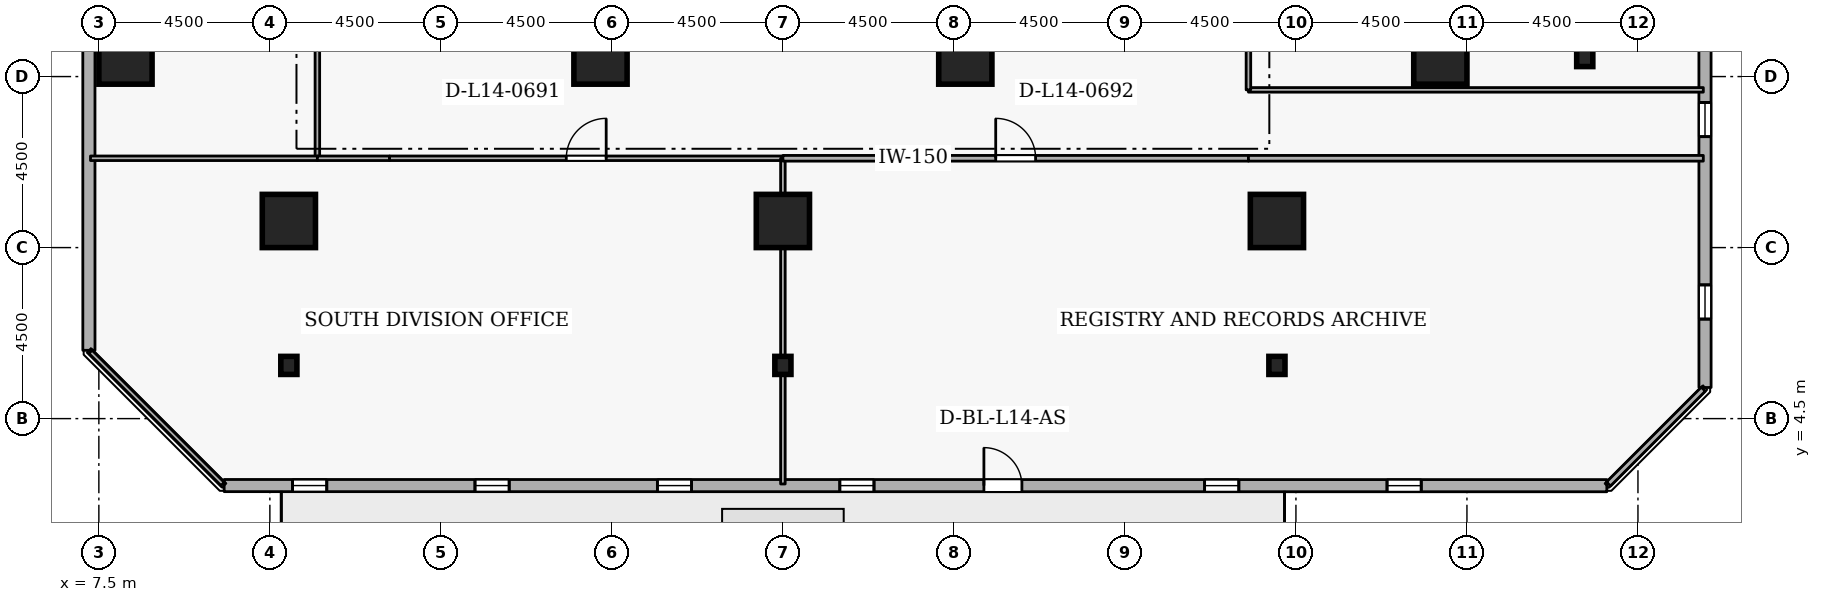
"""IFC4 building model, lengths in metres.
Left out: names, types, materials, properties, quantities, classifications, styles, units other than length and angle.
Written with IfcOpenShell. Run it as: python <this file> out.ifc"""

import sys

from ifc_helpers import new_model, si_unit, direction, frame, frame_2d, origin, origin_2d, place, context, subcontext, project, spatial, rectangle, i_section, extrude, element, fill, save


model = new_model("IFC4")
c1 = context("Model", 3, precision=1e-05, world=origin(), true_north=direction((0.0, 1.0)))
c2 = subcontext(c1, "Body", "Model", "MODEL_VIEW")
j1 = project(units=[si_unit("LENGTHUNIT", "METRE"), si_unit("PLANEANGLEUNIT", "RADIAN")], contexts=[c1])
p1 = place(None, origin())
s1 = spatial("IfcSite", under=j1, at=p1, CompositionType="ELEMENT")
p2 = place(p1, origin())
s2 = spatial("IfcBuilding", under=s1, at=p2, CompositionType="ELEMENT")
p3 = place(p2, frame((0.0, 0.0, 57.3)))
s3 = spatial("IfcBuildingStorey", under=s2, at=p3, CompositionType="ELEMENT", Elevation=57.3)
for number, where, z_axis, x_axis in (
    (1, (12.5, 9.7, 0.0), (0.0, 0.0, 1.0), (1.0, 0.0, 0.0)),
    (2, (25.5, 9.7, 0.0), (0.0, 0.0, 1.0), (1.0, 0.0, 0.0)),
    (3, (38.5, 9.7, 0.0), (0.0, 0.0, 1.0), (1.0, 0.0, 0.0)),
    (4, (42.8, 14.0, 0.0), (0.0, 0.0, 1.0), (1.0, 0.0, 0.0)),
    (5, (8.2, 14.0, 0.0), (0.0, 0.0, 1.0), (1.0, 0.0, 0.0)),
    (6, (20.7, 14.0, 0.0), (0.0, 0.0, 1.0), (1.0, 0.0, 0.0)),
    (7, (30.3, 14.0, 0.0), (0.0, 0.0, 1.0), (1.0, 0.0, 0.0)),
):
    element("IfcColumn", number, at=place(p3, frame(where, z_axis=z_axis, x_axis=x_axis)), inside=s3, PredefinedType="COLUMN", context=c2, shape_type="SweptSolid", body=[
        extrude(rectangle(XDim=1.4, YDim=1.4, at=origin_2d()), origin(), (0.0, 0.0, 1.0), 3.6),
    ])
for number, where, z_axis, x_axis in (
    (8, (12.5, 5.9, 0.0), (0.0, 0.0, 1.0), (1.0, 0.0, 0.0)),
    (9, (25.5, 5.9, 0.0), (0.0, 0.0, 1.0), (1.0, 0.0, 0.0)),
    (10, (38.5, 5.9, 0.0), (0.0, 0.0, 1.0), (1.0, 0.0, 0.0)),
    (11, (46.6, 14.0, 0.0), (0.0, 0.0, 1.0), (1.0, 0.0, 0.0)),
):
    element("IfcColumn", number, at=place(p3, frame(where, z_axis=z_axis, x_axis=x_axis)), inside=s3, PredefinedType="COLUMN", context=c2, shape_type="SweptSolid", body=[
        extrude(i_section(OverallWidth=0.424, OverallDepth=0.475, WebThickness=0.048, FlangeThickness=0.077, FilletRadius=0.015, at=origin_2d()), origin(), (0.0, 0.0, 1.0), 3.6),
    ])
p4 = place(p3, frame((10.797, 2.738, 0.0), z_axis=(0.0, 0.0, 1.0), x_axis=(0.999999996195, -8.7231344e-05, 0.0)))
e12 = element("IfcWall", 12, at=p4, inside=s3, PredefinedType="STANDARD", context=c2, shape_type="SweptSolid", body=[
    extrude(rectangle(XDim=36.384, YDim=0.32, at=frame_2d((18.192, 0.0))), origin(), (0.0, 0.0, 1.0), 2.7),
])
p5 = place(p4, frame((19.992, 0.0, 0.0)))
e13 = element("IfcOpeningElement", 13, at=p5, cuts=e12, PredefinedType="OPENING", context=c2, shape_type="SweptSolid", body=[
    extrude(rectangle(XDim=1.0, YDim=2.08, at=frame_2d((0.5, 1.04))), frame((0.0, 0.17, 0.0), z_axis=(0.0, -1.0, 0.0), x_axis=(1.0, 0.0, 0.0)), (0.0, 0.0, 1.0), 0.34),
])
p6 = place(p4, frame((1.8, 0.0, 0.72)))
e14 = element("IfcOpeningElement", 14, at=p6, cuts=e12, PredefinedType="OPENING", context=c2, shape_type="SweptSolid", body=[
    extrude(rectangle(XDim=0.9, YDim=1.75, at=frame_2d((0.45, 0.875))), frame((0.0, 0.17, 0.0), z_axis=(0.0, -1.0, 0.0), x_axis=(1.0, 0.0, 0.0)), (0.0, 0.0, 1.0), 0.34),
])
p7 = place(p4, frame((6.6, 0.0, 0.72)))
e15 = element("IfcOpeningElement", 15, at=p7, cuts=e12, PredefinedType="OPENING", context=c2, shape_type="SweptSolid", body=[
    extrude(rectangle(XDim=0.9, YDim=1.75, at=frame_2d((0.45, 0.875))), frame((0.0, 0.17, 0.0), z_axis=(0.0, -1.0, 0.0), x_axis=(1.0, 0.0, 0.0)), (0.0, 0.0, 1.0), 0.34),
])
p8 = place(p4, frame((11.4, 0.0, 0.72)))
e16 = element("IfcOpeningElement", 16, at=p8, cuts=e12, PredefinedType="OPENING", context=c2, shape_type="SweptSolid", body=[
    extrude(rectangle(XDim=0.9, YDim=1.75, at=frame_2d((0.45, 0.875))), frame((0.0, 0.17, 0.0), z_axis=(0.0, -1.0, 0.0), x_axis=(1.0, 0.0, 0.0)), (0.0, 0.0, 1.0), 0.34),
])
p9 = place(p4, frame((16.2, 0.0, 0.72)))
e17 = element("IfcOpeningElement", 17, at=p9, cuts=e12, PredefinedType="OPENING", context=c2, shape_type="SweptSolid", body=[
    extrude(rectangle(XDim=0.9, YDim=1.75, at=frame_2d((0.45, 0.875))), frame((0.0, 0.17, 0.0), z_axis=(0.0, -1.0, 0.0), x_axis=(1.0, 0.0, 0.0)), (0.0, 0.0, 1.0), 0.34),
])
p10 = place(p4, frame((25.8, 0.0, 0.72)))
e18 = element("IfcOpeningElement", 18, at=p10, cuts=e12, PredefinedType="OPENING", context=c2, shape_type="SweptSolid", body=[
    extrude(rectangle(XDim=0.9, YDim=1.75, at=frame_2d((0.45, 0.875))), frame((0.0, 0.17, 0.0), z_axis=(0.0, -1.0, 0.0), x_axis=(1.0, 0.0, 0.0)), (0.0, 0.0, 1.0), 0.34),
])
p11 = place(p4, frame((30.6, 0.0, 0.72)))
e19 = element("IfcOpeningElement", 19, at=p11, cuts=e12, PredefinedType="OPENING", context=c2, shape_type="SweptSolid", body=[
    extrude(rectangle(XDim=0.9, YDim=1.75, at=frame_2d((0.45, 0.875))), frame((0.0, 0.17, 0.0), z_axis=(0.0, -1.0, 0.0), x_axis=(1.0, 0.0, 0.0)), (0.0, 0.0, 1.0), 0.34),
])
p12 = place(p3, frame((49.765, 5.319, 0.0), z_axis=(0.0, 0.0, 1.0), x_axis=(-8.7231344e-05, 0.999999996195, 0.0)))
e20 = element("IfcWall", 20, at=p12, inside=s3, PredefinedType="STANDARD", context=c2, shape_type="SweptSolid", body=[
    extrude(rectangle(XDim=36.384, YDim=0.32, at=frame_2d((18.192, 0.0))), origin(), (0.0, 0.0, 1.0), 2.7),
])
p13 = place(p12, frame((1.8, 0.0, 0.72)))
e21 = element("IfcOpeningElement", 21, at=p13, cuts=e20, PredefinedType="OPENING", context=c2, shape_type="SweptSolid", body=[
    extrude(rectangle(XDim=0.9, YDim=1.75, at=frame_2d((0.45, 0.875))), frame((0.0, 0.17, 0.0), z_axis=(0.0, -1.0, 0.0), x_axis=(1.0, 0.0, 0.0)), (0.0, 0.0, 1.0), 0.34),
])
p14 = place(p12, frame((6.6, 0.0, 0.72)))
e22 = element("IfcOpeningElement", 22, at=p14, cuts=e20, PredefinedType="OPENING", context=c2, shape_type="SweptSolid", body=[
    extrude(rectangle(XDim=0.9, YDim=1.75, at=frame_2d((0.45, 0.875))), frame((0.0, 0.17, 0.0), z_axis=(0.0, -1.0, 0.0), x_axis=(1.0, 0.0, 0.0)), (0.0, 0.0, 1.0), 0.34),
])
p15 = place(p12, frame((11.4, 0.0, 0.72)))
e23 = element("IfcOpeningElement", 23, at=p15, cuts=e20, PredefinedType="OPENING", context=c2, shape_type="SweptSolid", body=[
    extrude(rectangle(XDim=0.9, YDim=1.75, at=frame_2d((0.45, 0.875))), frame((0.0, 0.17, 0.0), z_axis=(0.0, -1.0, 0.0), x_axis=(1.0, 0.0, 0.0)), (0.0, 0.0, 1.0), 0.34),
])
p16 = place(p12, frame((16.2, 0.0, 0.72)))
e24 = element("IfcOpeningElement", 24, at=p16, cuts=e20, PredefinedType="OPENING", context=c2, shape_type="SweptSolid", body=[
    extrude(rectangle(XDim=0.9, YDim=1.75, at=frame_2d((0.45, 0.875))), frame((0.0, 0.17, 0.0), z_axis=(0.0, -1.0, 0.0), x_axis=(1.0, 0.0, 0.0)), (0.0, 0.0, 1.0), 0.34),
])
p17 = place(p12, frame((25.8, 0.0, 0.72)))
e25 = element("IfcOpeningElement", 25, at=p17, cuts=e20, PredefinedType="OPENING", context=c2, shape_type="SweptSolid", body=[
    extrude(rectangle(XDim=0.9, YDim=1.75, at=frame_2d((0.45, 0.875))), frame((0.0, 0.17, 0.0), z_axis=(0.0, -1.0, 0.0), x_axis=(1.0, 0.0, 0.0)), (0.0, 0.0, 1.0), 0.34),
])
p18 = place(p12, frame((30.6, 0.0, 0.72)))
e26 = element("IfcOpeningElement", 26, at=p18, cuts=e20, PredefinedType="OPENING", context=c2, shape_type="SweptSolid", body=[
    extrude(rectangle(XDim=0.9, YDim=1.75, at=frame_2d((0.45, 0.875))), frame((0.0, 0.17, 0.0), z_axis=(0.0, -1.0, 0.0), x_axis=(1.0, 0.0, 0.0)), (0.0, 0.0, 1.0), 0.34),
])
p19 = place(p3, frame((7.235, 42.681, 0.0), z_axis=(0.0, 0.0, 1.0), x_axis=(8.7231344e-05, -0.999999996195, 0.0)))
e27 = element("IfcWall", 27, at=p19, inside=s3, PredefinedType="STANDARD", context=c2, shape_type="SweptSolid", body=[
    extrude(rectangle(XDim=36.384, YDim=0.32, at=frame_2d((18.192, 0.0))), origin(), (0.0, 0.0, 1.0), 2.7),
])
p20 = place(p19, frame((6.6, 0.0, 0.72)))
e28 = element("IfcOpeningElement", 28, at=p20, cuts=e27, PredefinedType="OPENING", context=c2, shape_type="SweptSolid", body=[
    extrude(rectangle(XDim=0.9, YDim=1.75, at=frame_2d((0.45, 0.875))), frame((0.0, 0.17, 0.0), z_axis=(0.0, -1.0, 0.0), x_axis=(1.0, 0.0, 0.0)), (0.0, 0.0, 1.0), 0.34),
])
p21 = place(p19, frame((11.4, 0.0, 0.72)))
e29 = element("IfcOpeningElement", 29, at=p21, cuts=e27, PredefinedType="OPENING", context=c2, shape_type="SweptSolid", body=[
    extrude(rectangle(XDim=0.9, YDim=1.75, at=frame_2d((0.45, 0.875))), frame((0.0, 0.17, 0.0), z_axis=(0.0, -1.0, 0.0), x_axis=(1.0, 0.0, 0.0)), (0.0, 0.0, 1.0), 0.34),
])
p22 = place(p19, frame((21.0, 0.0, 0.72)))
e30 = element("IfcOpeningElement", 30, at=p22, cuts=e27, PredefinedType="OPENING", context=c2, shape_type="SweptSolid", body=[
    extrude(rectangle(XDim=0.9, YDim=1.75, at=frame_2d((0.45, 0.875))), frame((0.0, 0.17, 0.0), z_axis=(0.0, -1.0, 0.0), x_axis=(1.0, 0.0, 0.0)), (0.0, 0.0, 1.0), 0.34),
])
p23 = place(p19, frame((25.8, 0.0, 0.72)))
e31 = element("IfcOpeningElement", 31, at=p23, cuts=e27, PredefinedType="OPENING", context=c2, shape_type="SweptSolid", body=[
    extrude(rectangle(XDim=0.9, YDim=1.75, at=frame_2d((0.45, 0.875))), frame((0.0, 0.17, 0.0), z_axis=(0.0, -1.0, 0.0), x_axis=(1.0, 0.0, 0.0)), (0.0, 0.0, 1.0), 0.34),
])
p24 = place(p3, frame((13.25, 20.7, 0.0), z_axis=(0.0, 0.0, 1.0), x_axis=(0.0, -1.0, 0.0)))
e32 = element("IfcWall", 32, at=p24, inside=s3, PredefinedType="PARTITIONING", context=c2, shape_type="SweptSolid", body=[
    extrude(rectangle(XDim=9.35, YDim=0.12, at=frame_2d((4.675, 0.0))), origin(), (0.0, 0.0, 1.0), 3.34),
])
p25 = place(p24, frame((4.15, 0.0, 0.0)))
e33 = element("IfcOpeningElement", 33, at=p25, cuts=e32, PredefinedType="OPENING", context=c2, shape_type="SweptSolid", body=[
    extrude(rectangle(XDim=1.05, YDim=2.1, at=frame_2d((0.525, 1.05))), frame((0.0, 0.07, 0.0), z_axis=(0.0, -1.0, 0.0), x_axis=(1.0, 0.0, 0.0)), (0.0, 0.0, 1.0), 0.14),
])
p26 = place(p3, frame((13.25, 11.35, 0.0), z_axis=(0.0, 0.0, 1.0), x_axis=(-1.0, 0.0, 0.0)))
e34 = element("IfcWall", 34, at=p26, inside=s3, PredefinedType="PARTITIONING", context=c2, shape_type="SweptSolid", body=[
    extrude(rectangle(XDim=5.97, YDim=0.12, at=frame_2d((2.985, 0.0))), origin(), (0.0, 0.0, 1.0), 3.34),
])
p27 = place(p3, frame((49.72, 13.15, 0.0), z_axis=(0.0, 0.0, 1.0), x_axis=(-1.0, 0.0, 0.0)))
e35 = element("IfcWall", 35, at=p27, inside=s3, PredefinedType="PARTITIONING", context=c2, shape_type="SweptSolid", body=[
    extrude(rectangle(XDim=11.97, YDim=0.12, at=frame_2d((5.985, 0.0))), origin(), (0.0, 0.0, 1.0), 3.34),
])
p28 = place(p3, frame((37.75, 13.15, 0.0), z_axis=(0.0, 0.0, 1.0), x_axis=(0.0, 1.0, 0.0)))
e36 = element("IfcWall", 36, at=p28, inside=s3, PredefinedType="PARTITIONING", context=c2, shape_type="SweptSolid", body=[
    extrude(rectangle(XDim=1.862, YDim=0.12, at=frame_2d((0.931, 0.0))), origin(), (0.0, 0.0, 1.0), 3.34),
])
p29 = place(p3, frame((13.25, 11.35, 0.0), z_axis=(0.0, 0.0, 1.0), x_axis=(1.0, 0.0, 0.0)))
e37 = element("IfcWall", 37, at=p29, inside=s3, PredefinedType="PARTITIONING", context=c2, shape_type="SweptSolid", body=[
    extrude(rectangle(XDim=1.9, YDim=0.12, at=frame_2d((0.95, 0.0))), origin(), (0.0, 0.0, 1.0), 3.34),
])
p30 = place(p3, frame((15.15, 11.35, 0.0), z_axis=(0.0, 0.0, 1.0), x_axis=(1.0, 0.0, 0.0)))
e38 = element("IfcWall", 38, at=p30, inside=s3, PredefinedType="PARTITIONING", context=c2, shape_type="SweptSolid", body=[
    extrude(rectangle(XDim=10.35, YDim=0.12, at=frame_2d((5.175, 0.0))), origin(), (0.0, 0.0, 1.0), 3.34),
])
p31 = place(p30, frame((4.65, 0.0, 0.0)))
e39 = element("IfcOpeningElement", 39, at=p31, cuts=e38, PredefinedType="OPENING", context=c2, shape_type="SweptSolid", body=[
    extrude(rectangle(XDim=1.05, YDim=2.1, at=frame_2d((0.525, 1.05))), frame((0.0, 0.07, 0.0), z_axis=(0.0, -1.0, 0.0), x_axis=(1.0, 0.0, 0.0)), (0.0, 0.0, 1.0), 0.14),
])
p32 = place(p3, frame((25.5, 11.35, 0.0), z_axis=(0.0, 0.0, 1.0), x_axis=(0.0, -1.0, 0.0)))
e40 = element("IfcWall", 40, at=p32, inside=s3, PredefinedType="PARTITIONING", context=c2, shape_type="SweptSolid", body=[
    extrude(rectangle(XDim=8.57, YDim=0.12, at=frame_2d((4.285, 0.0))), origin(), (0.0, 0.0, 1.0), 2.932),
])
p33 = place(p3, frame((10.757, 2.78, 0.0), z_axis=(0.0, 0.0, 1.0), x_axis=(-0.707106781187, 0.707106781187, 0.0)))
e41 = element("IfcWall", 41, at=p33, inside=s3, PredefinedType="PARTITIONING", context=c2, shape_type="SweptSolid", body=[
    extrude(rectangle(XDim=4.917, YDim=0.12, at=frame_2d((2.458, 0.0))), origin(), (0.0, 0.0, 1.0), 3.34),
])
p34 = place(p3, frame((25.5, 11.35, 0.0), z_axis=(0.0, 0.0, 1.0), x_axis=(1.0, 0.0, 0.0)))
e42 = element("IfcWall", 42, at=p34, inside=s3, PredefinedType="PARTITIONING", context=c2, shape_type="SweptSolid", body=[
    extrude(rectangle(XDim=12.25, YDim=0.15, at=frame_2d((6.125, 0.0))), origin(), (0.0, 0.0, 1.0), 3.34),
])
p35 = place(p34, frame((5.6, 0.0, 0.0)))
e43 = element("IfcOpeningElement", 43, at=p35, cuts=e42, PredefinedType="OPENING", context=c2, shape_type="SweptSolid", body=[
    extrude(rectangle(XDim=1.05, YDim=2.1, at=frame_2d((0.525, 1.05))), frame((0.0, 0.085, 0.0), z_axis=(0.0, -1.0, 0.0), x_axis=(1.0, 0.0, 0.0)), (0.0, 0.0, 1.0), 0.17),
])
p36 = place(p3, frame((37.75, 11.35, 0.0), z_axis=(0.0, 0.0, 1.0), x_axis=(1.0, 0.0, 0.0)))
e44 = element("IfcWall", 44, at=p36, inside=s3, PredefinedType="PARTITIONING", context=c2, shape_type="SweptSolid", body=[
    extrude(rectangle(XDim=11.97, YDim=0.15, at=frame_2d((5.985, 0.0))), origin(), (0.0, 0.0, 1.0), 3.34),
])
p37 = place(p3, frame((49.72, 5.275, 0.0), z_axis=(0.0, 0.0, 1.0), x_axis=(-0.707106781187, -0.707106781187, 0.0)))
e45 = element("IfcWall", 45, at=p37, inside=s3, PredefinedType="PARTITIONING", context=c2, shape_type="SweptSolid", body=[
    extrude(rectangle(XDim=3.528, YDim=0.15, at=frame_2d((1.764, 0.0))), origin(), (0.0, 0.0, 1.0), 3.34),
])
p38 = place(p5, origin())
e46 = element("IfcDoor", 46, at=p38, inside=s3, OperationType="SINGLE_SWING_LEFT", PredefinedType="DOOR", context=c2, shape_type="SweptSolid", body=[
    extrude(rectangle(XDim=1.0, YDim=2.08, at=frame_2d((0.5, 1.04))), frame((0.0, 0.025, 0.0), z_axis=(0.0, -1.0, 0.0), x_axis=(1.0, 0.0, 0.0)), (0.0, 0.0, 1.0), 0.05),
])
fill(e13, e46)
p39 = place(p6, origin())
e47 = element("IfcWindow", 47, at=p39, inside=s3, PartitioningType="SINGLE_PANEL", PredefinedType="WINDOW", context=c2, shape_type="SweptSolid", body=[
    extrude(rectangle(XDim=0.9, YDim=1.75, at=frame_2d((0.45, 0.875))), frame((0.0, 0.03, 0.0), z_axis=(0.0, -1.0, 0.0), x_axis=(1.0, 0.0, 0.0)), (0.0, 0.0, 1.0), 0.06),
])
fill(e14, e47)
p40 = place(p7, origin())
e48 = element("IfcWindow", 48, at=p40, inside=s3, PartitioningType="SINGLE_PANEL", PredefinedType="WINDOW", context=c2, shape_type="SweptSolid", body=[
    extrude(rectangle(XDim=0.9, YDim=1.75, at=frame_2d((0.45, 0.875))), frame((0.0, 0.03, 0.0), z_axis=(0.0, -1.0, 0.0), x_axis=(1.0, 0.0, 0.0)), (0.0, 0.0, 1.0), 0.06),
])
fill(e15, e48)
p41 = place(p8, origin())
e49 = element("IfcWindow", 49, at=p41, inside=s3, PartitioningType="SINGLE_PANEL", PredefinedType="WINDOW", context=c2, shape_type="SweptSolid", body=[
    extrude(rectangle(XDim=0.9, YDim=1.75, at=frame_2d((0.45, 0.875))), frame((0.0, 0.03, 0.0), z_axis=(0.0, -1.0, 0.0), x_axis=(1.0, 0.0, 0.0)), (0.0, 0.0, 1.0), 0.06),
])
fill(e16, e49)
p42 = place(p9, origin())
e50 = element("IfcWindow", 50, at=p42, inside=s3, PartitioningType="SINGLE_PANEL", PredefinedType="WINDOW", context=c2, shape_type="SweptSolid", body=[
    extrude(rectangle(XDim=0.9, YDim=1.75, at=frame_2d((0.45, 0.875))), frame((0.0, 0.03, 0.0), z_axis=(0.0, -1.0, 0.0), x_axis=(1.0, 0.0, 0.0)), (0.0, 0.0, 1.0), 0.06),
])
fill(e17, e50)
p43 = place(p10, origin())
e51 = element("IfcWindow", 51, at=p43, inside=s3, PartitioningType="SINGLE_PANEL", PredefinedType="WINDOW", context=c2, shape_type="SweptSolid", body=[
    extrude(rectangle(XDim=0.9, YDim=1.75, at=frame_2d((0.45, 0.875))), frame((0.0, 0.03, 0.0), z_axis=(0.0, -1.0, 0.0), x_axis=(1.0, 0.0, 0.0)), (0.0, 0.0, 1.0), 0.06),
])
fill(e18, e51)
p44 = place(p11, origin())
e52 = element("IfcWindow", 52, at=p44, inside=s3, PartitioningType="SINGLE_PANEL", PredefinedType="WINDOW", context=c2, shape_type="SweptSolid", body=[
    extrude(rectangle(XDim=0.9, YDim=1.75, at=frame_2d((0.45, 0.875))), frame((0.0, 0.03, 0.0), z_axis=(0.0, -1.0, 0.0), x_axis=(1.0, 0.0, 0.0)), (0.0, 0.0, 1.0), 0.06),
])
fill(e19, e52)
p45 = place(p13, origin())
e53 = element("IfcWindow", 53, at=p45, inside=s3, PartitioningType="SINGLE_PANEL", PredefinedType="WINDOW", context=c2, shape_type="SweptSolid", body=[
    extrude(rectangle(XDim=0.9, YDim=1.75, at=frame_2d((0.45, 0.875))), frame((0.0, 0.03, 0.0), z_axis=(0.0, -1.0, 0.0), x_axis=(1.0, 0.0, 0.0)), (0.0, 0.0, 1.0), 0.06),
])
fill(e21, e53)
p46 = place(p14, origin())
e54 = element("IfcWindow", 54, at=p46, inside=s3, PartitioningType="SINGLE_PANEL", PredefinedType="WINDOW", context=c2, shape_type="SweptSolid", body=[
    extrude(rectangle(XDim=0.9, YDim=1.75, at=frame_2d((0.45, 0.875))), frame((0.0, 0.03, 0.0), z_axis=(0.0, -1.0, 0.0), x_axis=(1.0, 0.0, 0.0)), (0.0, 0.0, 1.0), 0.06),
])
fill(e22, e54)
p47 = place(p31, origin())
e55 = element("IfcDoor", 55, at=p47, inside=s3, OperationType="SINGLE_SWING_RIGHT", PredefinedType="DOOR", context=c2, shape_type="SweptSolid", body=[
    extrude(rectangle(XDim=1.05, YDim=2.1, at=frame_2d((0.525, 1.05))), frame((0.0, 0.025, 0.0), z_axis=(0.0, -1.0, 0.0), x_axis=(1.0, 0.0, 0.0)), (0.0, 0.0, 1.0), 0.05),
])
fill(e39, e55)
p48 = place(p35, origin())
e56 = element("IfcDoor", 56, at=p48, inside=s3, OperationType="SINGLE_SWING_LEFT", PredefinedType="DOOR", context=c2, shape_type="SweptSolid", body=[
    extrude(rectangle(XDim=1.05, YDim=2.1, at=frame_2d((0.525, 1.05))), frame((0.0, 0.025, 0.0), z_axis=(0.0, -1.0, 0.0), x_axis=(1.0, 0.0, 0.0)), (0.0, 0.0, 1.0), 0.05),
])
fill(e43, e56)
save(model, sys.argv[1])
